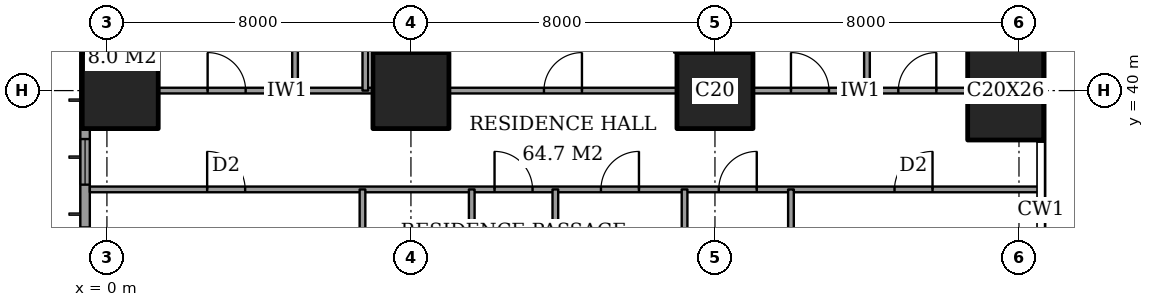
"""IFC4 building model, lengths in metres.
Left out: names, types, materials, properties, quantities, classifications, styles, units other than length and angle.
Written with IfcOpenShell. Run it as: python <this file> out.ifc"""

import sys

from ifc_helpers import new_model, si_unit, direction, frame, frame_2d, origin, origin_2d, place, context, subcontext, project, spatial, rectangle, extrude, element, fill, save


model = new_model("IFC4")
c1 = context("Model", 3, precision=1e-05, world=origin(), true_north=direction((0.0, 1.0)))
c2 = subcontext(c1, "Body", "Model", "MODEL_VIEW")
j1 = project(units=[si_unit("LENGTHUNIT", "METRE"), si_unit("PLANEANGLEUNIT", "RADIAN")], contexts=[c1])
p1 = place(None, origin())
s1 = spatial("IfcSite", under=j1, at=p1, CompositionType="ELEMENT")
p2 = place(p1, origin())
s2 = spatial("IfcBuilding", under=s1, at=p2, CompositionType="ELEMENT")
p3 = place(p2, frame((0.0, 0.0, 146.6)))
s3 = spatial("IfcBuildingStorey", under=s2, at=p3, CompositionType="ELEMENT", Elevation=146.6)
for number, where, z_axis, x_axis in (
    (1, (0.35, 40.0, 0.0), (0.0, 0.0, 1.0), (1.0, 0.0, 0.0)),
    (2, (8.0, 40.0, 0.0), (0.0, 0.0, 1.0), (1.0, 0.0, 0.0)),
    (3, (16.0, 40.0, 0.0), (0.0, 0.0, 1.0), (1.0, 0.0, 0.0)),
):
    element("IfcColumn", number, at=place(p3, frame(where, z_axis=z_axis, x_axis=x_axis)), inside=s3, PredefinedType="COLUMN", context=c2, shape_type="SweptSolid", body=[
        extrude(rectangle(XDim=2.0, YDim=2.0, at=origin_2d()), origin(), (0.0, 0.0, 1.0), 3.6),
    ])
p4 = place(p3, frame((23.65, 40.0, 0.0), z_axis=(0.0, 0.0, 1.0), x_axis=(1.0, 0.0, 0.0)))
e4 = element("IfcColumn", 4, at=p4, inside=s3, PredefinedType="COLUMN", context=c2, shape_type="SweptSolid", body=[
    extrude(rectangle(XDim=2.0, YDim=2.6, at=origin_2d()), origin(), (0.0, 0.0, 1.0), 3.6),
])
p5 = place(p3, frame((-0.575, 44.825, 0.0), z_axis=(0.0, 0.0, 1.0), x_axis=(0.0, -1.0, 0.0)))
e5 = element("IfcWall", 5, at=p5, inside=s3, PredefinedType="SOLIDWALL", context=c2, shape_type="SweptSolid", body=[
    extrude(rectangle(XDim=41.65, YDim=0.25, at=frame_2d((20.825, 0.0))), origin(), (0.0, 0.0, 1.0), 3.6),
])
p6 = place(p5, frame((0.775, 0.0, 0.4)))
e6 = element("IfcOpeningElement", 6, at=p6, cuts=e5, PredefinedType="OPENING", context=c2, shape_type="SweptSolid", body=[
    extrude(rectangle(XDim=2.4, YDim=2.2, at=frame_2d((1.2, 1.1))), frame((0.0, 0.135, 0.0), z_axis=(0.0, -1.0, 0.0), x_axis=(1.0, 0.0, 0.0)), (0.0, 0.0, 1.0), 0.27),
])
p7 = place(p5, frame((6.1, 0.0, 0.4)))
e7 = element("IfcOpeningElement", 7, at=p7, cuts=e5, PredefinedType="OPENING", context=c2, shape_type="SweptSolid", body=[
    extrude(rectangle(XDim=1.2, YDim=2.2, at=frame_2d((0.6, 1.1))), frame((0.0, 0.135, 0.0), z_axis=(0.0, -1.0, 0.0), x_axis=(1.0, 0.0, 0.0)), (0.0, 0.0, 1.0), 0.27),
])
p8 = place(p5, frame((8.425, 0.0, 0.4)))
e8 = element("IfcOpeningElement", 8, at=p8, cuts=e5, PredefinedType="OPENING", context=c2, shape_type="SweptSolid", body=[
    extrude(rectangle(XDim=2.4, YDim=2.2, at=frame_2d((1.2, 1.1))), frame((0.0, 0.135, 0.0), z_axis=(0.0, -1.0, 0.0), x_axis=(1.0, 0.0, 0.0)), (0.0, 0.0, 1.0), 0.27),
])
p9 = place(p5, frame((15.625, 0.0, 0.4)))
e9 = element("IfcOpeningElement", 9, at=p9, cuts=e5, PredefinedType="OPENING", context=c2, shape_type="SweptSolid", body=[
    extrude(rectangle(XDim=2.4, YDim=2.2, at=frame_2d((1.2, 1.1))), frame((0.0, 0.135, 0.0), z_axis=(0.0, -1.0, 0.0), x_axis=(1.0, 0.0, 0.0)), (0.0, 0.0, 1.0), 0.27),
])
p10 = place(p5, frame((23.625, 0.0, 0.4)))
e10 = element("IfcOpeningElement", 10, at=p10, cuts=e5, PredefinedType="OPENING", context=c2, shape_type="SweptSolid", body=[
    extrude(rectangle(XDim=2.4, YDim=2.2, at=frame_2d((1.2, 1.1))), frame((0.0, 0.135, 0.0), z_axis=(0.0, -1.0, 0.0), x_axis=(1.0, 0.0, 0.0)), (0.0, 0.0, 1.0), 0.27),
])
p11 = place(p5, frame((30.625, 0.0, 0.4)))
e11 = element("IfcOpeningElement", 11, at=p11, cuts=e5, PredefinedType="OPENING", context=c2, shape_type="SweptSolid", body=[
    extrude(rectangle(XDim=2.4, YDim=2.2, at=frame_2d((1.2, 1.1))), frame((0.0, 0.135, 0.0), z_axis=(0.0, -1.0, 0.0), x_axis=(1.0, 0.0, 0.0)), (0.0, 0.0, 1.0), 0.27),
])
p12 = place(p5, frame((34.225, 0.0, 0.4)))
e12 = element("IfcOpeningElement", 12, at=p12, cuts=e5, PredefinedType="OPENING", context=c2, shape_type="SweptSolid", body=[
    extrude(rectangle(XDim=1.2, YDim=2.2, at=frame_2d((0.6, 1.1))), frame((0.0, 0.135, 0.0), z_axis=(0.0, -1.0, 0.0), x_axis=(1.0, 0.0, 0.0)), (0.0, 0.0, 1.0), 0.27),
])
p13 = place(p5, frame((38.475, 0.0, 0.4)))
e13 = element("IfcOpeningElement", 13, at=p13, cuts=e5, PredefinedType="OPENING", context=c2, shape_type="SweptSolid", body=[
    extrude(rectangle(XDim=2.4, YDim=2.2, at=frame_2d((1.2, 1.1))), frame((0.0, 0.135, 0.0), z_axis=(0.0, -1.0, 0.0), x_axis=(1.0, 0.0, 0.0)), (0.0, 0.0, 1.0), 0.27),
])
p14 = place(p3, frame((-0.45, 37.4, 0.0), z_axis=(0.0, 0.0, 1.0), x_axis=(1.0, 0.0, 0.0)))
e14 = element("IfcWall", 14, at=p14, inside=s3, PredefinedType="PARTITIONING", context=c2, shape_type="SweptSolid", body=[
    extrude(rectangle(XDim=25.011, YDim=0.15, at=frame_2d((12.505, 0.0))), origin(), (0.0, 0.0, 1.0), 3.35),
])
p15 = place(p14, frame((10.65, 0.0, 0.0)))
e15 = element("IfcOpeningElement", 15, at=p15, cuts=e14, PredefinedType="OPENING", context=c2, shape_type="SweptSolid", body=[
    extrude(rectangle(XDim=1.0, YDim=2.1, at=frame_2d((0.5, 1.05))), frame((0.0, 0.085, 0.0), z_axis=(0.0, -1.0, 0.0), x_axis=(1.0, 0.0, 0.0)), (0.0, 0.0, 1.0), 0.17),
])
p16 = place(p14, frame((3.087, 0.0, 0.0)))
e16 = element("IfcOpeningElement", 16, at=p16, cuts=e14, PredefinedType="OPENING", context=c2, shape_type="SweptSolid", body=[
    extrude(rectangle(XDim=1.0, YDim=2.1, at=frame_2d((0.5, 1.05))), frame((0.0, 0.085, 0.0), z_axis=(0.0, -1.0, 0.0), x_axis=(1.0, 0.0, 0.0)), (0.0, 0.0, 1.0), 0.17),
])
p17 = place(p14, frame((13.45, 0.0, 0.0)))
e17 = element("IfcOpeningElement", 17, at=p17, cuts=e14, PredefinedType="OPENING", context=c2, shape_type="SweptSolid", body=[
    extrude(rectangle(XDim=1.0, YDim=2.1, at=frame_2d((0.5, 1.05))), frame((0.0, 0.085, 0.0), z_axis=(0.0, -1.0, 0.0), x_axis=(1.0, 0.0, 0.0)), (0.0, 0.0, 1.0), 0.17),
])
p18 = place(p14, frame((16.55, 0.0, 0.0)))
e18 = element("IfcOpeningElement", 18, at=p18, cuts=e14, PredefinedType="OPENING", context=c2, shape_type="SweptSolid", body=[
    extrude(rectangle(XDim=1.0, YDim=2.1, at=frame_2d((0.5, 1.05))), frame((0.0, 0.085, 0.0), z_axis=(0.0, -1.0, 0.0), x_axis=(1.0, 0.0, 0.0)), (0.0, 0.0, 1.0), 0.17),
])
p19 = place(p14, frame((21.175, 0.0, 0.0)))
e19 = element("IfcOpeningElement", 19, at=p19, cuts=e14, PredefinedType="OPENING", context=c2, shape_type="SweptSolid", body=[
    extrude(rectangle(XDim=1.0, YDim=2.1, at=frame_2d((0.5, 1.05))), frame((0.0, 0.085, 0.0), z_axis=(0.0, -1.0, 0.0), x_axis=(1.0, 0.0, 0.0)), (0.0, 0.0, 1.0), 0.17),
])
p20 = place(p3, frame((1.35, 40.0, 0.0), z_axis=(0.0, 0.0, 1.0), x_axis=(1.0, 0.0, 0.0)))
e20 = element("IfcWall", 20, at=p20, inside=s3, PredefinedType="PARTITIONING", context=c2, shape_type="SweptSolid", body=[
    extrude(rectangle(XDim=5.65, YDim=0.15, at=frame_2d((2.825, 0.0))), origin(), (0.0, 0.0, 1.0), 3.35),
])
p21 = place(p20, frame((1.3, 0.0, 0.0)))
e21 = element("IfcOpeningElement", 21, at=p21, cuts=e20, PredefinedType="OPENING", context=c2, shape_type="SweptSolid", body=[
    extrude(rectangle(XDim=1.0, YDim=2.1, at=frame_2d((0.5, 1.05))), frame((0.0, 0.085, 0.0), z_axis=(0.0, -1.0, 0.0), x_axis=(1.0, 0.0, 0.0)), (0.0, 0.0, 1.0), 0.17),
])
p22 = place(p3, frame((9.0, 40.0, 0.0), z_axis=(0.0, 0.0, 1.0), x_axis=(1.0, 0.0, 0.0)))
e22 = element("IfcWall", 22, at=p22, inside=s3, PredefinedType="PARTITIONING", context=c2, shape_type="SweptSolid", body=[
    extrude(rectangle(XDim=6.0, YDim=0.15, at=frame_2d((3.0, 0.0))), origin(), (0.0, 0.0, 1.0), 3.35),
])
p23 = place(p22, frame((2.5, 0.0, 0.0)))
e23 = element("IfcOpeningElement", 23, at=p23, cuts=e22, PredefinedType="OPENING", context=c2, shape_type="SweptSolid", body=[
    extrude(rectangle(XDim=1.0, YDim=2.1, at=frame_2d((0.5, 1.05))), frame((0.0, 0.085, 0.0), z_axis=(0.0, -1.0, 0.0), x_axis=(1.0, 0.0, 0.0)), (0.0, 0.0, 1.0), 0.17),
])
p24 = place(p3, frame((17.0, 40.0, 0.0), z_axis=(0.0, 0.0, 1.0), x_axis=(1.0, 0.0, 0.0)))
e24 = element("IfcWall", 24, at=p24, inside=s3, PredefinedType="PARTITIONING", context=c2, shape_type="SweptSolid", body=[
    extrude(rectangle(XDim=5.65, YDim=0.15, at=frame_2d((2.825, 0.0))), origin(), (0.0, 0.0, 1.0), 3.35),
])
p25 = place(p24, frame((1.0, 0.0, 0.0)))
e25 = element("IfcOpeningElement", 25, at=p25, cuts=e24, PredefinedType="OPENING", context=c2, shape_type="SweptSolid", body=[
    extrude(rectangle(XDim=1.0, YDim=2.1, at=frame_2d((0.5, 1.05))), frame((0.0, 0.085, 0.0), z_axis=(0.0, -1.0, 0.0), x_axis=(1.0, 0.0, 0.0)), (0.0, 0.0, 1.0), 0.17),
])
p26 = place(p24, frame((3.825, 0.0, 0.0)))
e26 = element("IfcOpeningElement", 26, at=p26, cuts=e24, PredefinedType="OPENING", context=c2, shape_type="SweptSolid", body=[
    extrude(rectangle(XDim=1.0, YDim=2.1, at=frame_2d((0.5, 1.05))), frame((0.0, 0.085, 0.0), z_axis=(0.0, -1.0, 0.0), x_axis=(1.0, 0.0, 0.0)), (0.0, 0.0, 1.0), 0.17),
])
p27 = place(p3, frame((4.95, 40.0, 0.0), z_axis=(0.0, 0.0, 1.0), x_axis=(0.0, 1.0, 0.0)))
e27 = element("IfcWall", 27, at=p27, inside=s3, PredefinedType="PARTITIONING", context=c2, shape_type="SweptSolid", body=[
    extrude(rectangle(XDim=8.45, YDim=0.15, at=frame_2d((4.225, 0.0))), origin(), (0.0, 0.0, 1.0), 3.35),
])
p28 = place(p27, frame((3.775, 0.0, 0.0)))
e28 = element("IfcOpeningElement", 28, at=p28, cuts=e27, PredefinedType="OPENING", context=c2, shape_type="SweptSolid", body=[
    extrude(rectangle(XDim=0.9, YDim=2.1, at=frame_2d((0.45, 1.05))), frame((0.0, 0.085, 0.0), z_axis=(0.0, -1.0, 0.0), x_axis=(1.0, 0.0, 0.0)), (0.0, 0.0, 1.0), 0.17),
])
p29 = place(p3, frame((6.725, 33.2, 0.0), z_axis=(0.0, 0.0, 1.0), x_axis=(0.0, 1.0, 0.0)))
e29 = element("IfcWall", 29, at=p29, inside=s3, PredefinedType="PARTITIONING", context=c2, shape_type="SweptSolid", body=[
    extrude(rectangle(XDim=4.2, YDim=0.15, at=frame_2d((2.1, 0.0))), origin(), (0.0, 0.0, 1.0), 3.35),
])
p30 = place(p29, frame((2.1, 0.0, 0.0)))
e30 = element("IfcOpeningElement", 30, at=p30, cuts=e29, PredefinedType="OPENING", context=c2, shape_type="SweptSolid", body=[
    extrude(rectangle(XDim=0.9, YDim=2.1, at=frame_2d((0.45, 1.05))), frame((0.0, 0.085, 0.0), z_axis=(0.0, -1.0, 0.0), x_axis=(1.0, 0.0, 0.0)), (0.0, 0.0, 1.0), 0.17),
])
p31 = place(p3, frame((6.8, 40.0, 0.0), z_axis=(0.0, 0.0, 1.0), x_axis=(0.0, 1.0, 0.0)))
e31 = element("IfcWall", 31, at=p31, inside=s3, PredefinedType="PARTITIONING", context=c2, shape_type="SweptSolid", body=[
    extrude(rectangle(XDim=8.45, YDim=0.15, at=frame_2d((4.225, 0.0))), origin(), (0.0, 0.0, 1.0), 3.35),
])
p32 = place(p3, frame((9.6, 28.0, 0.0), z_axis=(0.0, 0.0, 1.0), x_axis=(0.0, 1.0, 0.0)))
e32 = element("IfcWall", 32, at=p32, inside=s3, PredefinedType="PARTITIONING", context=c2, shape_type="SweptSolid", body=[
    extrude(rectangle(XDim=9.4, YDim=0.15, at=frame_2d((4.7, 0.0))), origin(), (0.0, 0.0, 1.0), 3.35),
])
p33 = place(p32, frame((0.5, 0.0, 0.0)))
e33 = element("IfcOpeningElement", 33, at=p33, cuts=e32, PredefinedType="OPENING", context=c2, shape_type="SweptSolid", body=[
    extrude(rectangle(XDim=1.0, YDim=2.1, at=frame_2d((0.5, 1.05))), frame((0.0, 0.085, 0.0), z_axis=(0.0, -1.0, 0.0), x_axis=(1.0, 0.0, 0.0)), (0.0, 0.0, 1.0), 0.17),
])
p34 = place(p3, frame((11.8, 30.0, 0.0), z_axis=(0.0, 0.0, 1.0), x_axis=(0.0, 1.0, 0.0)))
e34 = element("IfcWall", 34, at=p34, inside=s3, PredefinedType="PARTITIONING", context=c2, shape_type="SweptSolid", body=[
    extrude(rectangle(XDim=7.4, YDim=0.15, at=frame_2d((3.7, 0.0))), origin(), (0.0, 0.0, 1.0), 3.35),
])
p35 = place(p3, frame((15.2, 33.2, 0.0), z_axis=(0.0, 0.0, 1.0), x_axis=(0.0, 1.0, 0.0)))
e35 = element("IfcWall", 35, at=p35, inside=s3, PredefinedType="PARTITIONING", context=c2, shape_type="SweptSolid", body=[
    extrude(rectangle(XDim=4.2, YDim=0.15, at=frame_2d((2.1, 0.0))), origin(), (0.0, 0.0, 1.0), 3.35),
])
p36 = place(p3, frame((18.0, 31.4, 0.0), z_axis=(0.0, 0.0, 1.0), x_axis=(0.0, 1.0, 0.0)))
e36 = element("IfcWall", 36, at=p36, inside=s3, PredefinedType="PARTITIONING", context=c2, shape_type="SweptSolid", body=[
    extrude(rectangle(XDim=6.0, YDim=0.15, at=frame_2d((3.0, 0.0))), origin(), (0.0, 0.0, 1.0), 3.35),
])
p37 = place(p3, frame((20.0, 40.0, 0.0), z_axis=(0.0, 0.0, 1.0), x_axis=(0.0, 1.0, 0.0)))
e37 = element("IfcWall", 37, at=p37, inside=s3, PredefinedType="PARTITIONING", context=c2, shape_type="SweptSolid", body=[
    extrude(rectangle(XDim=8.45, YDim=0.15, at=frame_2d((4.225, 0.0))), origin(), (0.0, 0.0, 1.0), 3.35),
])
p38 = place(p7, origin())
e38 = element("IfcWindow", 38, at=p38, inside=s3, PartitioningType="SINGLE_PANEL", PredefinedType="WINDOW", context=c2, shape_type="SweptSolid", body=[
    extrude(rectangle(XDim=1.2, YDim=2.2, at=frame_2d((0.6, 1.1))), frame((0.0, 0.03, 0.0), z_axis=(0.0, -1.0, 0.0), x_axis=(1.0, 0.0, 0.0)), (0.0, 0.0, 1.0), 0.06),
])
fill(e7, e38)
p39 = place(p21, origin())
e39 = element("IfcDoor", 39, at=p39, inside=s3, OperationType="SINGLE_SWING_RIGHT", PredefinedType="DOOR", context=c2, shape_type="SweptSolid", body=[
    extrude(rectangle(XDim=1.0, YDim=2.1, at=frame_2d((0.5, 1.05))), frame((0.0, 0.025, 0.0), z_axis=(0.0, -1.0, 0.0), x_axis=(1.0, 0.0, 0.0)), (0.0, 0.0, 1.0), 0.05),
])
fill(e21, e39)
p40 = place(p23, origin())
e40 = element("IfcDoor", 40, at=p40, inside=s3, OperationType="SINGLE_SWING_LEFT", PredefinedType="DOOR", context=c2, shape_type="SweptSolid", body=[
    extrude(rectangle(XDim=1.0, YDim=2.1, at=frame_2d((0.5, 1.05))), frame((0.0, 0.025, 0.0), z_axis=(0.0, -1.0, 0.0), x_axis=(1.0, 0.0, 0.0)), (0.0, 0.0, 1.0), 0.05),
])
fill(e23, e40)
p41 = place(p25, origin())
e41 = element("IfcDoor", 41, at=p41, inside=s3, OperationType="SINGLE_SWING_RIGHT", PredefinedType="DOOR", context=c2, shape_type="SweptSolid", body=[
    extrude(rectangle(XDim=1.0, YDim=2.1, at=frame_2d((0.5, 1.05))), frame((0.0, 0.025, 0.0), z_axis=(0.0, -1.0, 0.0), x_axis=(1.0, 0.0, 0.0)), (0.0, 0.0, 1.0), 0.05),
])
fill(e25, e41)
p42 = place(p26, origin())
e42 = element("IfcDoor", 42, at=p42, inside=s3, OperationType="SINGLE_SWING_LEFT", PredefinedType="DOOR", context=c2, shape_type="SweptSolid", body=[
    extrude(rectangle(XDim=1.0, YDim=2.1, at=frame_2d((0.5, 1.05))), frame((0.0, 0.025, 0.0), z_axis=(0.0, -1.0, 0.0), x_axis=(1.0, 0.0, 0.0)), (0.0, 0.0, 1.0), 0.05),
])
fill(e26, e42)
p43 = place(p15, origin())
e43 = element("IfcDoor", 43, at=p43, inside=s3, OperationType="SINGLE_SWING_RIGHT", PredefinedType="DOOR", context=c2, shape_type="SweptSolid", body=[
    extrude(rectangle(XDim=1.0, YDim=2.1, at=frame_2d((0.5, 1.05))), frame((0.0, 0.025, 0.0), z_axis=(0.0, -1.0, 0.0), x_axis=(1.0, 0.0, 0.0)), (0.0, 0.0, 1.0), 0.05),
])
fill(e15, e43)
p44 = place(p16, origin())
e44 = element("IfcDoor", 44, at=p44, inside=s3, OperationType="SINGLE_SWING_RIGHT", PredefinedType="DOOR", context=c2, shape_type="SweptSolid", body=[
    extrude(rectangle(XDim=1.0, YDim=2.1, at=frame_2d((0.5, 1.05))), frame((0.0, 0.025, 0.0), z_axis=(0.0, -1.0, 0.0), x_axis=(1.0, 0.0, 0.0)), (0.0, 0.0, 1.0), 0.05),
])
fill(e16, e44)
p45 = place(p17, origin())
e45 = element("IfcDoor", 45, at=p45, inside=s3, OperationType="SINGLE_SWING_LEFT", PredefinedType="DOOR", context=c2, shape_type="SweptSolid", body=[
    extrude(rectangle(XDim=1.0, YDim=2.1, at=frame_2d((0.5, 1.05))), frame((0.0, 0.025, 0.0), z_axis=(0.0, -1.0, 0.0), x_axis=(1.0, 0.0, 0.0)), (0.0, 0.0, 1.0), 0.05),
])
fill(e17, e45)
p46 = place(p18, origin())
e46 = element("IfcDoor", 46, at=p46, inside=s3, OperationType="SINGLE_SWING_LEFT", PredefinedType="DOOR", context=c2, shape_type="SweptSolid", body=[
    extrude(rectangle(XDim=1.0, YDim=2.1, at=frame_2d((0.5, 1.05))), frame((0.0, 0.025, 0.0), z_axis=(0.0, -1.0, 0.0), x_axis=(1.0, 0.0, 0.0)), (0.0, 0.0, 1.0), 0.05),
])
fill(e18, e46)
p47 = place(p19, origin())
e47 = element("IfcDoor", 47, at=p47, inside=s3, OperationType="SINGLE_SWING_LEFT", PredefinedType="DOOR", context=c2, shape_type="SweptSolid", body=[
    extrude(rectangle(XDim=1.0, YDim=2.1, at=frame_2d((0.5, 1.05))), frame((0.0, 0.025, 0.0), z_axis=(0.0, -1.0, 0.0), x_axis=(1.0, 0.0, 0.0)), (0.0, 0.0, 1.0), 0.05),
])
fill(e19, e47)
save(model, sys.argv[1])
